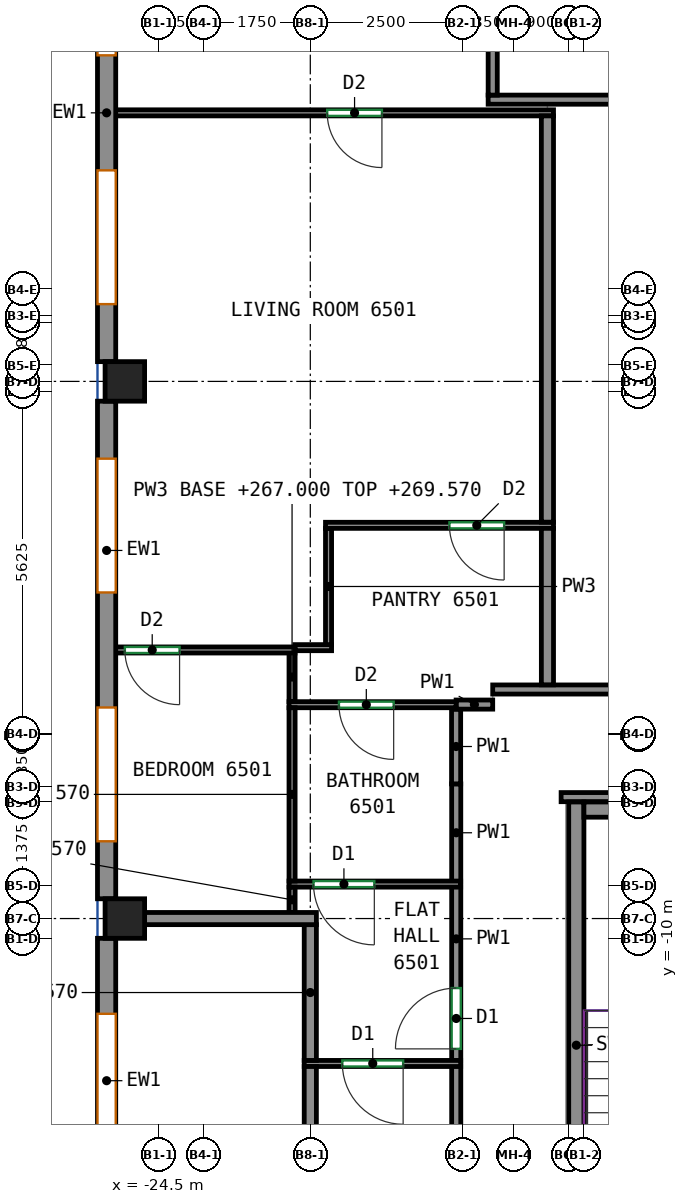
"""IFC4 building model, lengths in metres.
Left out: names, types, materials, properties, quantities, classifications, styles, units other than length and angle.
Written with IfcOpenShell. Run it as: python <this file> out.ifc"""

import sys

from ifc_helpers import new_model, si_unit, direction, frame, frame_2d, origin, origin_2d, place, context, subcontext, project, spatial, rectangle, extrude, source, transform, mapped, element, fill, save


model = new_model("IFC4")
c1 = context("Model", 3, precision=1e-05, world=origin(), true_north=direction((0.0, 1.0)))
c2 = subcontext(c1, "Body", "Model", "MODEL_VIEW")
j1 = project(units=[si_unit("LENGTHUNIT", "METRE"), si_unit("PLANEANGLEUNIT", "RADIAN")], contexts=[c1])
p1 = place(None, origin())
s1 = spatial("IfcSite", under=j1, at=p1, CompositionType="ELEMENT")
p2 = place(p1, origin())
s2 = spatial("IfcBuilding", under=s1, at=p2, CompositionType="ELEMENT")
p3 = place(p2, frame((0.0, 0.0, 267.0)))
s3 = spatial("IfcBuildingStorey", under=s2, at=p3, CompositionType="ELEMENT", Elevation=267.0)
m1 = source(origin(), c2, "Body", "SweptSolid", [
    extrude(rectangle(XDim=0.65, YDim=0.65, at=origin_2d()), origin(), (0.0, 0.0, 1.0), 3.12),
])
for number, where, z_axis, x_axis in (
    (1, (-25.05, -9.667, 0.0), (0.0, 0.0, 1.0), (1.0, 0.0, 0.0)),
    (2, (-25.05, -0.833, 0.0), (0.0, 0.0, 1.0), (1.0, 0.0, 0.0)),
):
    element("IfcColumn", number, at=place(p3, frame(where, z_axis=z_axis, x_axis=x_axis)), inside=s3, PredefinedType="COLUMN", context=c2, shape_type="MappedRepresentation", body=[
        mapped(m1, transform((0.0, 0.0, 0.0))),
    ])
m2 = source(origin(), c2, "Body", "SweptSolid", [
    extrude(rectangle(XDim=8.0, YDim=0.25, at=frame_2d((4.0, 0.0))), origin(), (0.0, 0.0, 1.0), 3.12),
])
p4 = place(p3, frame((-17.625, -15.75, 0.0), z_axis=(0.0, 0.0, 1.0), x_axis=(0.0, 1.0, 0.0)))
e3 = element("IfcWall", 3, at=p4, inside=s3, PredefinedType="SHEAR", context=c2, shape_type="MappedRepresentation", body=[
    mapped(m2, transform((0.0, 0.0, 0.0))),
])
m3 = source(origin(), c2, "Body", "SweptSolid", [
    extrude(rectangle(XDim=3.7, YDim=0.25, at=frame_2d((1.85, 0.0))), origin(), (0.0, 0.0, 1.0), 3.12),
])
p5 = place(p3, frame((-17.5, -7.875, 0.0), z_axis=(0.0, 0.0, 1.0), x_axis=(1.0, 0.0, 0.0)))
e4 = element("IfcWall", 4, at=p5, inside=s3, PredefinedType="SHEAR", context=c2, shape_type="MappedRepresentation", body=[
    mapped(m3, transform((0.0, 0.0, 0.0))),
])
m4 = source(origin(), c2, "Body", "SweptSolid", [
    extrude(rectangle(XDim=8.183, YDim=0.3, at=frame_2d((4.092, 0.0))), origin(), (0.0, 0.0, 1.0), 3.12),
])
p6 = place(p3, frame((-25.35, 7.675, 0.0), z_axis=(0.0, 0.0, 1.0), x_axis=(0.0, -1.0, 0.0)))
e5 = element("IfcWall", 5, at=p6, inside=s3, PredefinedType="SOLIDWALL", context=c2, shape_type="MappedRepresentation", body=[
    mapped(m4, transform((0.0, 0.0, 0.0))),
])
p7 = place(p6, frame((0.946, 0.0, 0.8)))
e6 = element("IfcOpeningElement", 6, at=p7, cuts=e5, PredefinedType="OPENING", context=c2, shape_type="SweptSolid", body=[
    extrude(rectangle(XDim=2.2, YDim=2.05, at=frame_2d((1.1, 1.025))), frame((0.0, 0.16, 0.0), z_axis=(0.0, -1.0, 0.0), x_axis=(1.0, 0.0, 0.0)), (0.0, 0.0, 1.0), 0.32),
])
p8 = place(p6, frame((5.037, 0.0, 0.8)))
e7 = element("IfcOpeningElement", 7, at=p8, cuts=e5, PredefinedType="OPENING", context=c2, shape_type="SweptSolid", body=[
    extrude(rectangle(XDim=2.2, YDim=2.05, at=frame_2d((1.1, 1.025))), frame((0.0, 0.16, 0.0), z_axis=(0.0, -1.0, 0.0), x_axis=(1.0, 0.0, 0.0)), (0.0, 0.0, 1.0), 0.32),
])
m5 = source(origin(), c2, "Body", "SweptSolid", [
    extrude(rectangle(XDim=8.184, YDim=0.3, at=frame_2d((4.092, 0.0))), origin(), (0.0, 0.0, 1.0), 3.12),
])
p9 = place(p3, frame((-25.35, -1.158, 0.0), z_axis=(0.0, 0.0, 1.0), x_axis=(0.0, -1.0, 0.0)))
e8 = element("IfcWall", 8, at=p9, inside=s3, PredefinedType="SOLIDWALL", context=c2, shape_type="MappedRepresentation", body=[
    mapped(m5, transform((0.0, 0.0, 0.0))),
])
p10 = place(p9, frame((0.946, 0.0, 0.8)))
e9 = element("IfcOpeningElement", 9, at=p10, cuts=e8, PredefinedType="OPENING", context=c2, shape_type="SweptSolid", body=[
    extrude(rectangle(XDim=2.2, YDim=2.05, at=frame_2d((1.1, 1.025))), frame((0.0, 0.16, 0.0), z_axis=(0.0, -1.0, 0.0), x_axis=(1.0, 0.0, 0.0)), (0.0, 0.0, 1.0), 0.32),
])
p11 = place(p9, frame((5.038, 0.0, 0.8)))
e10 = element("IfcOpeningElement", 10, at=p11, cuts=e8, PredefinedType="OPENING", context=c2, shape_type="SweptSolid", body=[
    extrude(rectangle(XDim=2.2, YDim=2.05, at=frame_2d((1.1, 1.025))), frame((0.0, 0.16, 0.0), z_axis=(0.0, -1.0, 0.0), x_axis=(1.0, 0.0, 0.0)), (0.0, 0.0, 1.0), 0.32),
])
m6 = source(origin(), c2, "Body", "SweptSolid", [
    extrude(rectangle(XDim=4.683, YDim=0.3, at=frame_2d((2.342, 0.0))), origin(), (0.0, 0.0, 1.0), 3.12),
])
p12 = place(p3, frame((-25.35, -9.992, 0.0), z_axis=(0.0, 0.0, 1.0), x_axis=(0.0, -1.0, 0.0)))
e11 = element("IfcWall", 11, at=p12, inside=s3, PredefinedType="SOLIDWALL", context=c2, shape_type="MappedRepresentation", body=[
    mapped(m6, transform((0.0, 0.0, 0.0))),
])
p13 = place(p12, frame((1.242, 0.0, 0.8)))
e12 = element("IfcOpeningElement", 12, at=p13, cuts=e11, PredefinedType="OPENING", context=c2, shape_type="SweptSolid", body=[
    extrude(rectangle(XDim=2.2, YDim=2.05, at=frame_2d((1.1, 1.025))), frame((0.0, 0.16, 0.0), z_axis=(0.0, -1.0, 0.0), x_axis=(1.0, 0.0, 0.0)), (0.0, 0.0, 1.0), 0.32),
])
p14 = place(p3, frame((-19.6, -14.91, 0.0), z_axis=(0.0, 0.0, 1.0), x_axis=(0.0, 1.0, 0.0)))
e13 = element("IfcWall", 13, at=p14, inside=s3, PredefinedType="PARTITIONING", context=c2, shape_type="SweptSolid", body=[
    extrude(rectangle(XDim=2.82, YDim=0.15, at=frame_2d((1.41, 0.0))), origin(), (0.0, 0.0, 1.0), 3.12),
])
p15 = place(p3, frame((-19.6, -12.01, 0.0), z_axis=(0.0, 0.0, 1.0), x_axis=(0.0, 1.0, 0.0)))
e14 = element("IfcWall", 14, at=p15, inside=s3, PredefinedType="PARTITIONING", context=c2, shape_type="SweptSolid", body=[
    extrude(rectangle(XDim=2.87, YDim=0.15, at=frame_2d((1.435, 0.0))), origin(), (0.0, 0.0, 1.0), 3.12),
])
p16 = place(p15, frame((0.2, 0.0, 0.0)))
e15 = element("IfcOpeningElement", 15, at=p16, cuts=e14, PredefinedType="OPENING", context=c2, shape_type="SweptSolid", body=[
    extrude(rectangle(XDim=1.0, YDim=2.1, at=frame_2d((0.5, 1.05))), frame((0.0, 0.085, 0.0), z_axis=(0.0, -1.0, 0.0), x_axis=(1.0, 0.0, 0.0)), (0.0, 0.0, 1.0), 0.17),
])
p17 = place(p3, frame((-19.6, -9.06, 0.0), z_axis=(0.0, 0.0, 1.0), x_axis=(0.0, 1.0, 0.0)))
e16 = element("IfcWall", 16, at=p17, inside=s3, PredefinedType="PARTITIONING", context=c2, shape_type="SweptSolid", body=[
    extrude(rectangle(XDim=1.608, YDim=0.15, at=frame_2d((0.804, 0.0))), origin(), (0.0, 0.0, 1.0), 3.12),
])
p18 = place(p3, frame((-19.602, -7.452, 0.0), z_axis=(0.0, 0.0, 1.0), x_axis=(0.0, 1.0, 0.0)))
e17 = element("IfcWall", 17, at=p18, inside=s3, PredefinedType="PARTITIONING", context=c2, shape_type="SweptSolid", body=[
    extrude(rectangle(XDim=1.229, YDim=0.15, at=frame_2d((0.615, 0.0))), origin(), (0.0, 0.0, 1.0), 3.12),
])
p19 = place(p3, frame((-19.0, -6.148, 0.0), z_axis=(0.0, 0.0, 1.0), x_axis=(-1.0, 0.0, 0.0)))
e18 = element("IfcWall", 18, at=p19, inside=s3, PredefinedType="PARTITIONING", context=c2, shape_type="SweptSolid", body=[
    extrude(rectangle(XDim=0.602, YDim=0.15, at=frame_2d((0.301, 0.0))), origin(), (0.0, 0.0, 1.0), 3.12),
])
p20 = place(p3, frame((-19.0, -5.9, 0.0), z_axis=(0.0, 0.0, 1.0), x_axis=(1.0, 0.0, 0.0)))
e19 = element("IfcWall", 19, at=p20, inside=s3, PredefinedType="PARTITIONING", context=c2, shape_type="SweptSolid", body=[
    extrude(rectangle(XDim=25.655, YDim=0.15, at=frame_2d((12.828, 0.0))), origin(), (0.0, 0.0, 1.0), 3.12),
])
p21 = place(p20, frame((4.796, 0.0, 0.0)))
e20 = element("IfcOpeningElement", 20, at=p21, cuts=e19, PredefinedType="OPENING", context=c2, shape_type="SweptSolid", body=[
    extrude(rectangle(XDim=0.9, YDim=2.1, at=frame_2d((0.45, 1.05))), frame((0.0, 0.085, 0.0), z_axis=(0.0, -1.0, 0.0), x_axis=(1.0, 0.0, 0.0)), (0.0, 0.0, 1.0), 0.17),
])
p22 = place(p20, frame((21.535, 0.0, 0.0)))
e21 = element("IfcOpeningElement", 21, at=p22, cuts=e19, PredefinedType="OPENING", context=c2, shape_type="SweptSolid", body=[
    extrude(rectangle(XDim=0.9, YDim=2.1, at=frame_2d((0.45, 1.05))), frame((0.0, 0.085, 0.0), z_axis=(0.0, -1.0, 0.0), x_axis=(1.0, 0.0, 0.0)), (0.0, 0.0, 1.0), 0.17),
])
p23 = place(p3, frame((-19.075, 3.8, 0.0), z_axis=(0.0, 0.0, 1.0), x_axis=(1.0, 0.0, 0.0)))
e22 = element("IfcWall", 22, at=p23, inside=s3, PredefinedType="PARTITIONING", context=c2, shape_type="SweptSolid", body=[
    extrude(rectangle(XDim=4.89, YDim=0.15, at=frame_2d((2.445, 0.0))), origin(), (0.0, 0.0, 1.0), 3.12),
])
p24 = place(p3, frame((-19.0, 3.875, 0.0), z_axis=(0.0, 0.0, 1.0), x_axis=(0.0, 1.0, 0.0)))
e23 = element("IfcWall", 23, at=p24, inside=s3, PredefinedType="PARTITIONING", context=c2, shape_type="SweptSolid", body=[
    extrude(rectangle(XDim=4.035, YDim=0.15, at=frame_2d((2.018, 0.0))), origin(), (0.0, 0.0, 1.0), 3.12),
])
p25 = place(p3, frame((-17.875, -7.67, 0.0), z_axis=(0.0, 0.0, 1.0), x_axis=(1.0, 0.0, 0.0)))
e24 = element("IfcWall", 24, at=p25, inside=s3, PredefinedType="PARTITIONING", context=c2, shape_type="SweptSolid", body=[
    extrude(rectangle(XDim=13.385, YDim=0.15, at=frame_2d((6.692, 0.0))), origin(), (0.0, 0.0, 1.0), 3.12),
])
p26 = place(p25, frame((10.774, 0.0, 0.0)))
e25 = element("IfcOpeningElement", 25, at=p26, cuts=e24, PredefinedType="OPENING", context=c2, shape_type="SweptSolid", body=[
    extrude(rectangle(XDim=0.9, YDim=2.1, at=frame_2d((0.45, 1.05))), frame((0.0, 0.085, 0.0), z_axis=(0.0, -1.0, 0.0), x_axis=(1.0, 0.0, 0.0)), (0.0, 0.0, 1.0), 0.17),
])
p27 = place(p3, frame((-19.527, -12.05, 0.0), z_axis=(0.0, 0.0, 1.0), x_axis=(-1.0, 0.0, 0.0)))
e26 = element("IfcWall", 26, at=p27, inside=s3, PredefinedType="PARTITIONING", context=c2, shape_type="SweptSolid", body=[
    extrude(rectangle(XDim=2.573, YDim=0.1, at=frame_2d((1.287, 0.0))), origin(), (0.0, 0.0, 1.0), 3.12),
])
p28 = place(p27, frame((0.946, 0.0, 0.0)))
e27 = element("IfcOpeningElement", 27, at=p28, cuts=e26, PredefinedType="OPENING", context=c2, shape_type="SweptSolid", body=[
    extrude(rectangle(XDim=1.0, YDim=2.1, at=frame_2d((0.5, 1.05))), frame((0.0, 0.06, 0.0), z_axis=(0.0, -1.0, 0.0), x_axis=(1.0, 0.0, 0.0)), (0.0, 0.0, 1.0), 0.12),
])
p29 = place(p3, frame((-22.0, -14.9, 0.0), z_axis=(0.0, 0.0, 1.0), x_axis=(0.0, 1.0, 0.0)))
e28 = element("IfcWall", 28, at=p29, inside=s3, PredefinedType="PARTITIONING", context=c2, shape_type="SweptSolid", body=[
    extrude(rectangle(XDim=2.8, YDim=0.2, at=frame_2d((1.4, 0.0))), origin(), (0.0, 0.0, 1.0), 2.57),
])
p30 = place(p3, frame((-19.527, -9.1, 0.0), z_axis=(0.0, 0.0, 1.0), x_axis=(-1.0, 0.0, 0.0)))
e29 = element("IfcWall", 29, at=p30, inside=s3, PredefinedType="PARTITIONING", context=c2, shape_type="SweptSolid", body=[
    extrude(rectangle(XDim=2.823, YDim=0.1, at=frame_2d((1.412, 0.0))), origin(), (0.0, 0.0, 1.0), 3.12),
])
p31 = place(p30, frame((1.42, 0.0, 0.0)))
e30 = element("IfcOpeningElement", 30, at=p31, cuts=e29, PredefinedType="OPENING", context=c2, shape_type="SweptSolid", body=[
    extrude(rectangle(XDim=1.0, YDim=2.1, at=frame_2d((0.5, 1.05))), frame((0.0, 0.06, 0.0), z_axis=(0.0, -1.0, 0.0), x_axis=(1.0, 0.0, 0.0)), (0.0, 0.0, 1.0), 0.12),
])
p32 = place(p3, frame((-22.3, -9.567, 0.0), z_axis=(0.0, 0.0, 1.0), x_axis=(0.0, 1.0, 0.0)))
e31 = element("IfcWall", 31, at=p32, inside=s3, PredefinedType="PARTITIONING", context=c2, shape_type="SweptSolid", body=[
    extrude(rectangle(XDim=0.417, YDim=0.1, at=frame_2d((0.208, 0.0))), origin(), (0.0, 0.0, 1.0), 2.57),
])
p33 = place(p3, frame((-22.0, -12.0, 0.0), z_axis=(0.0, 0.0, 1.0), x_axis=(0.0, 1.0, 0.0)))
e32 = element("IfcWall", 32, at=p33, inside=s3, PredefinedType="PARTITIONING", context=c2, shape_type="SweptSolid", body=[
    extrude(rectangle(XDim=2.233, YDim=0.2, at=frame_2d((1.116, 0.0))), origin(), (0.0, 0.0, 1.0), 2.57),
])
p34 = place(p3, frame((-19.602, -6.15, 0.0), z_axis=(0.0, 0.0, 1.0), x_axis=(-1.0, 0.0, 0.0)))
e33 = element("IfcWall", 33, at=p34, inside=s3, PredefinedType="PARTITIONING", context=c2, shape_type="SweptSolid", body=[
    extrude(rectangle(XDim=2.748, YDim=0.1, at=frame_2d((1.374, 0.0))), origin(), (0.0, 0.0, 1.0), 3.12),
])
p35 = place(p34, frame((1.027, 0.0, 0.0)))
e34 = element("IfcOpeningElement", 34, at=p35, cuts=e33, PredefinedType="OPENING", context=c2, shape_type="SweptSolid", body=[
    extrude(rectangle(XDim=0.9, YDim=2.1, at=frame_2d((0.45, 1.05))), frame((0.0, 0.06, 0.0), z_axis=(0.0, -1.0, 0.0), x_axis=(1.0, 0.0, 0.0)), (0.0, 0.0, 1.0), 0.12),
])
p36 = place(p3, frame((-22.3, -9.05, 0.0), z_axis=(0.0, 0.0, 1.0), x_axis=(0.0, 1.0, 0.0)))
e35 = element("IfcWall", 35, at=p36, inside=s3, PredefinedType="PARTITIONING", context=c2, shape_type="SweptSolid", body=[
    extrude(rectangle(XDim=2.85, YDim=0.1, at=frame_2d((1.425, 0.0))), origin(), (0.0, 0.0, 1.0), 2.57),
])
p37 = place(p3, frame((-22.3, -6.1, 0.0), z_axis=(0.0, 0.0, 1.0), x_axis=(0.0, 1.0, 0.0)))
e36 = element("IfcWall", 36, at=p37, inside=s3, PredefinedType="PARTITIONING", context=c2, shape_type="SweptSolid", body=[
    extrude(rectangle(XDim=0.81, YDim=0.1, at=frame_2d((0.405, 0.0))), origin(), (0.0, 0.0, 1.0), 2.57),
])
p38 = place(p3, frame((-21.65, -5.212, 0.0), z_axis=(0.0, 0.0, 1.0), x_axis=(-1.0, 0.0, 0.0)))
e37 = element("IfcWall", 37, at=p38, inside=s3, PredefinedType="PARTITIONING", context=c2, shape_type="SweptSolid", body=[
    extrude(rectangle(XDim=0.602, YDim=0.1, at=frame_2d((0.301, 0.0))), origin(), (0.0, 0.0, 1.0), 3.12),
])
p39 = place(p3, frame((-21.7, -5.162, 0.0), z_axis=(0.0, 0.0, 1.0), x_axis=(0.0, 1.0, 0.0)))
e38 = element("IfcWall", 38, at=p39, inside=s3, PredefinedType="PARTITIONING", context=c2, shape_type="SweptSolid", body=[
    extrude(rectangle(XDim=1.912, YDim=0.1, at=frame_2d((0.956, 0.0))), origin(), (0.0, 0.0, 1.0), 2.57),
])
p40 = place(p3, frame((-18.0, -3.2, 0.0), z_axis=(0.0, 0.0, 1.0), x_axis=(-1.0, 0.0, 0.0)))
e39 = element("IfcWall", 39, at=p40, inside=s3, PredefinedType="PARTITIONING", context=c2, shape_type="SweptSolid", body=[
    extrude(rectangle(XDim=3.75, YDim=0.1, at=frame_2d((1.875, 0.0))), origin(), (0.0, 0.0, 1.0), 3.12),
])
p41 = place(p40, frame((0.812, 0.0, 0.0)))
e40 = element("IfcOpeningElement", 40, at=p41, cuts=e39, PredefinedType="OPENING", context=c2, shape_type="SweptSolid", body=[
    extrude(rectangle(XDim=0.9, YDim=2.1, at=frame_2d((0.45, 1.05))), frame((0.0, 0.06, 0.0), z_axis=(0.0, -1.0, 0.0), x_axis=(1.0, 0.0, 0.0)), (0.0, 0.0, 1.0), 0.12),
])
p42 = place(p3, frame((-18.1, -5.823, 0.0), z_axis=(0.0, 0.0, 1.0), x_axis=(0.0, 1.0, 0.0)))
e41 = element("IfcWall", 41, at=p42, inside=s3, PredefinedType="PARTITIONING", context=c2, shape_type="SweptSolid", body=[
    extrude(rectangle(XDim=2.573, YDim=0.2, at=frame_2d((1.287, 0.0))), origin(), (0.0, 0.0, 1.0), 3.12),
])
p43 = place(p3, frame((-22.252, -5.25, 0.0), z_axis=(0.0, 0.0, 1.0), x_axis=(-1.0, 0.0, 0.0)))
e42 = element("IfcWall", 42, at=p43, inside=s3, PredefinedType="PARTITIONING", context=c2, shape_type="SweptSolid", body=[
    extrude(rectangle(XDim=2.998, YDim=0.1, at=frame_2d((1.499, 0.0))), origin(), (0.0, 0.0, 1.0), 3.12),
])
p44 = place(p43, frame((1.898, 0.0, 0.0)))
e43 = element("IfcOpeningElement", 43, at=p44, cuts=e42, PredefinedType="OPENING", context=c2, shape_type="SweptSolid", body=[
    extrude(rectangle(XDim=0.9, YDim=2.1, at=frame_2d((0.45, 1.05))), frame((0.0, 0.06, 0.0), z_axis=(0.0, -1.0, 0.0), x_axis=(1.0, 0.0, 0.0)), (0.0, 0.0, 1.0), 0.12),
])
p45 = place(p3, frame((-24.725, -9.667, 0.0), z_axis=(0.0, 0.0, 1.0), x_axis=(1.0, 0.0, 0.0)))
e44 = element("IfcWall", 44, at=p45, inside=s3, PredefinedType="PARTITIONING", context=c2, shape_type="SweptSolid", body=[
    extrude(rectangle(XDim=2.825, YDim=0.2, at=frame_2d((1.413, 0.0))), origin(), (0.0, 0.0, 1.0), 3.12),
])
p46 = place(p3, frame((-18.0, 3.583, 0.0), z_axis=(0.0, 0.0, 1.0), x_axis=(-1.0, 0.0, 0.0)))
e45 = element("IfcWall", 45, at=p46, inside=s3, PredefinedType="PARTITIONING", context=c2, shape_type="SweptSolid", body=[
    extrude(rectangle(XDim=7.25, YDim=0.1, at=frame_2d((3.625, 0.0))), origin(), (0.0, 0.0, 1.0), 3.12),
])
p47 = place(p46, frame((2.822, 0.0, 0.0)))
e46 = element("IfcOpeningElement", 46, at=p47, cuts=e45, PredefinedType="OPENING", context=c2, shape_type="SweptSolid", body=[
    extrude(rectangle(XDim=0.9, YDim=2.1, at=frame_2d((0.45, 1.05))), frame((0.0, 0.06, 0.0), z_axis=(0.0, -1.0, 0.0), x_axis=(1.0, 0.0, 0.0)), (0.0, 0.0, 1.0), 0.12),
])
p48 = place(p3, frame((-18.1, -3.148, 0.0), z_axis=(0.0, 0.0, 1.0), x_axis=(0.0, 1.0, 0.0)))
e47 = element("IfcWall", 47, at=p48, inside=s3, PredefinedType="PARTITIONING", context=c2, shape_type="SweptSolid", body=[
    extrude(rectangle(XDim=6.681, YDim=0.2, at=frame_2d((3.34, 0.0))), origin(), (0.0, 0.0, 1.0), 3.12),
])
p49 = place(p7, origin())
e48 = element("IfcWindow", 48, at=p49, inside=s3, PartitioningType="SINGLE_PANEL", PredefinedType="WINDOW", context=c2, shape_type="SweptSolid", body=[
    extrude(rectangle(XDim=2.2, YDim=2.05, at=frame_2d((1.1, 1.025))), frame((0.0, 0.03, 0.0), z_axis=(0.0, -1.0, 0.0), x_axis=(1.0, 0.0, 0.0)), (0.0, 0.0, 1.0), 0.06),
])
fill(e6, e48)
p50 = place(p8, origin())
e49 = element("IfcWindow", 49, at=p50, inside=s3, PartitioningType="SINGLE_PANEL", PredefinedType="WINDOW", context=c2, shape_type="SweptSolid", body=[
    extrude(rectangle(XDim=2.2, YDim=2.05, at=frame_2d((1.1, 1.025))), frame((0.0, 0.03, 0.0), z_axis=(0.0, -1.0, 0.0), x_axis=(1.0, 0.0, 0.0)), (0.0, 0.0, 1.0), 0.06),
])
fill(e7, e49)
p51 = place(p10, origin())
e50 = element("IfcWindow", 50, at=p51, inside=s3, PartitioningType="SINGLE_PANEL", PredefinedType="WINDOW", context=c2, shape_type="SweptSolid", body=[
    extrude(rectangle(XDim=2.2, YDim=2.05, at=frame_2d((1.1, 1.025))), frame((0.0, 0.03, 0.0), z_axis=(0.0, -1.0, 0.0), x_axis=(1.0, 0.0, 0.0)), (0.0, 0.0, 1.0), 0.06),
])
fill(e9, e50)
p52 = place(p11, origin())
e51 = element("IfcWindow", 51, at=p52, inside=s3, PartitioningType="SINGLE_PANEL", PredefinedType="WINDOW", context=c2, shape_type="SweptSolid", body=[
    extrude(rectangle(XDim=2.2, YDim=2.05, at=frame_2d((1.1, 1.025))), frame((0.0, 0.03, 0.0), z_axis=(0.0, -1.0, 0.0), x_axis=(1.0, 0.0, 0.0)), (0.0, 0.0, 1.0), 0.06),
])
fill(e10, e51)
p53 = place(p13, origin())
e52 = element("IfcWindow", 52, at=p53, inside=s3, PartitioningType="SINGLE_PANEL", PredefinedType="WINDOW", context=c2, shape_type="SweptSolid", body=[
    extrude(rectangle(XDim=2.2, YDim=2.05, at=frame_2d((1.1, 1.025))), frame((0.0, 0.03, 0.0), z_axis=(0.0, -1.0, 0.0), x_axis=(1.0, 0.0, 0.0)), (0.0, 0.0, 1.0), 0.06),
])
fill(e12, e52)
p54 = place(p28, origin())
e53 = element("IfcDoor", 53, at=p54, inside=s3, OperationType="SINGLE_SWING_LEFT", PredefinedType="DOOR", context=c2, shape_type="SweptSolid", body=[
    extrude(rectangle(XDim=1.0, YDim=2.1, at=frame_2d((0.5, 1.05))), frame((0.0, 0.025, 0.0), z_axis=(0.0, -1.0, 0.0), x_axis=(1.0, 0.0, 0.0)), (0.0, 0.0, 1.0), 0.05),
])
fill(e27, e53)
p55 = place(p16, origin())
e54 = element("IfcDoor", 54, at=p55, inside=s3, OperationType="SINGLE_SWING_LEFT", PredefinedType="DOOR", context=c2, shape_type="SweptSolid", body=[
    extrude(rectangle(XDim=1.0, YDim=2.1, at=frame_2d((0.5, 1.05))), frame((0.0, 0.025, 0.0), z_axis=(0.0, -1.0, 0.0), x_axis=(1.0, 0.0, 0.0)), (0.0, 0.0, 1.0), 0.05),
])
fill(e15, e54)
p56 = place(p31, origin())
e55 = element("IfcDoor", 55, at=p56, inside=s3, OperationType="SINGLE_SWING_LEFT", PredefinedType="DOOR", context=c2, shape_type="SweptSolid", body=[
    extrude(rectangle(XDim=1.0, YDim=2.1, at=frame_2d((0.5, 1.05))), frame((0.0, 0.025, 0.0), z_axis=(0.0, -1.0, 0.0), x_axis=(1.0, 0.0, 0.0)), (0.0, 0.0, 1.0), 0.05),
])
fill(e30, e55)
p57 = place(p35, origin())
e56 = element("IfcDoor", 56, at=p57, inside=s3, OperationType="SINGLE_SWING_LEFT", PredefinedType="DOOR", context=c2, shape_type="SweptSolid", body=[
    extrude(rectangle(XDim=0.9, YDim=2.1, at=frame_2d((0.45, 1.05))), frame((0.0, 0.025, 0.0), z_axis=(0.0, -1.0, 0.0), x_axis=(1.0, 0.0, 0.0)), (0.0, 0.0, 1.0), 0.05),
])
fill(e34, e56)
p58 = place(p44, origin())
e57 = element("IfcDoor", 57, at=p58, inside=s3, OperationType="SINGLE_SWING_LEFT", PredefinedType="DOOR", context=c2, shape_type="SweptSolid", body=[
    extrude(rectangle(XDim=0.9, YDim=2.1, at=frame_2d((0.45, 1.05))), frame((0.0, 0.025, 0.0), z_axis=(0.0, -1.0, 0.0), x_axis=(1.0, 0.0, 0.0)), (0.0, 0.0, 1.0), 0.05),
])
fill(e43, e57)
p59 = place(p41, origin())
e58 = element("IfcDoor", 58, at=p59, inside=s3, OperationType="SINGLE_SWING_LEFT", PredefinedType="DOOR", context=c2, shape_type="SweptSolid", body=[
    extrude(rectangle(XDim=0.9, YDim=2.1, at=frame_2d((0.45, 1.05))), frame((0.0, 0.025, 0.0), z_axis=(0.0, -1.0, 0.0), x_axis=(1.0, 0.0, 0.0)), (0.0, 0.0, 1.0), 0.05),
])
fill(e40, e58)
p60 = place(p47, origin())
e59 = element("IfcDoor", 59, at=p60, inside=s3, OperationType="SINGLE_SWING_LEFT", PredefinedType="DOOR", context=c2, shape_type="SweptSolid", body=[
    extrude(rectangle(XDim=0.9, YDim=2.1, at=frame_2d((0.45, 1.05))), frame((0.0, 0.025, 0.0), z_axis=(0.0, -1.0, 0.0), x_axis=(1.0, 0.0, 0.0)), (0.0, 0.0, 1.0), 0.05),
])
fill(e46, e59)
save(model, sys.argv[1])
